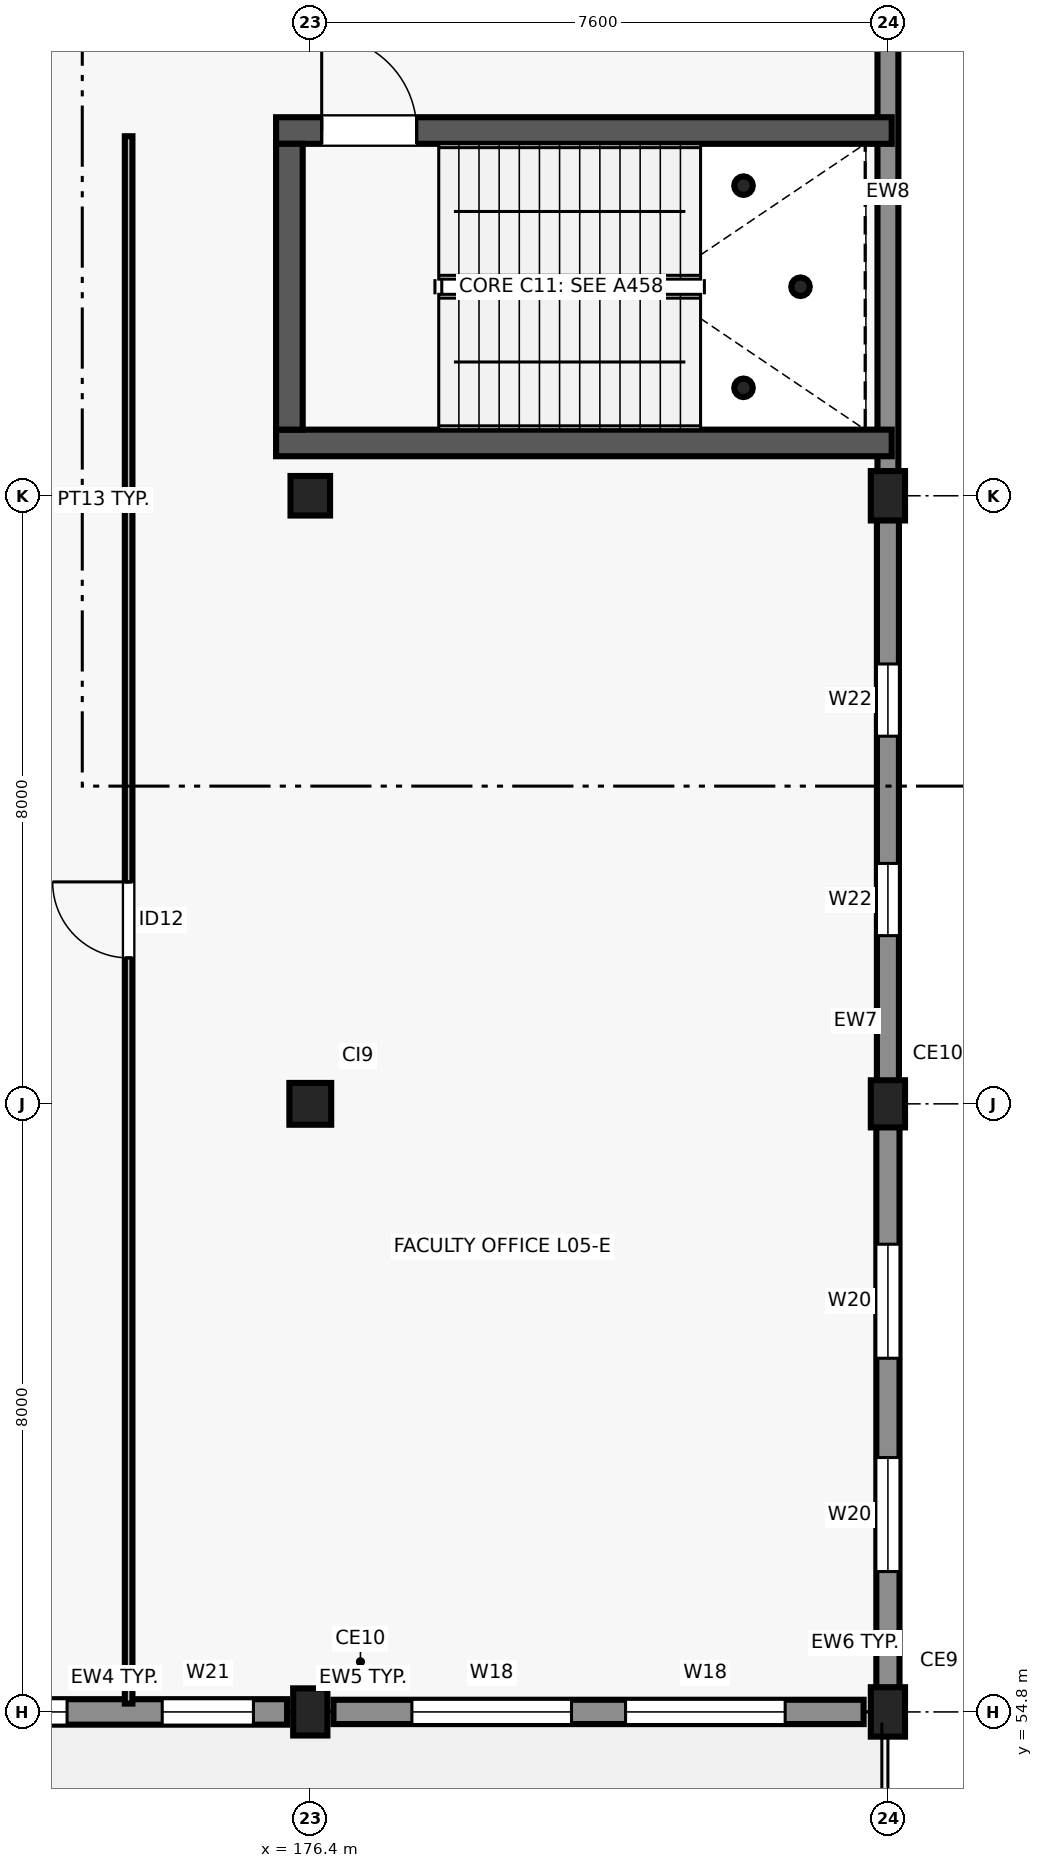
"""IFC4 building model, lengths in metres.
Left out: names, types, materials, properties, quantities, classifications, styles, units other than length and angle.
Written with IfcOpenShell. Run it as: python <this file> out.ifc"""

import sys

from ifc_helpers import new_model, si_unit, direction, frame, frame_2d, origin, origin_2d, place, context, subcontext, project, spatial, rectangle, hollow_circle, extrude, element, fill, save


model = new_model("IFC4")
c1 = context("Model", 3, precision=1e-05, world=origin(), true_north=direction((0.0, 1.0)))
c2 = subcontext(c1, "Body", "Model", "MODEL_VIEW")
j1 = project(units=[si_unit("LENGTHUNIT", "METRE"), si_unit("PLANEANGLEUNIT", "RADIAN")], contexts=[c1])
p1 = place(None, origin())
s1 = spatial("IfcSite", under=j1, at=p1, CompositionType="ELEMENT")
p2 = place(p1, origin())
s2 = spatial("IfcBuilding", under=s1, at=p2, CompositionType="ELEMENT")
p3 = place(p2, frame((0.0, 0.0, 21.6)))
s3 = spatial("IfcBuildingStorey", under=s2, at=p3, CompositionType="ELEMENT", Elevation=21.6)
p4 = place(p3, frame((176.4, 54.8, 0.0), z_axis=(0.0, 0.0, 1.0), x_axis=(1.0, 0.0, 0.0)))
e1 = element("IfcColumn", 1, at=p4, inside=s3, PredefinedType="COLUMN", context=c2, shape_type="SweptSolid", body=[
    extrude(rectangle(XDim=0.62, YDim=0.45, at=origin_2d()), origin(), (0.0, 0.0, 1.0), 4.2),
])
p5 = place(p3, frame((176.4, 62.8, 0.0), z_axis=(0.0, 0.0, 1.0), x_axis=(1.0, 0.0, 0.0)))
e2 = element("IfcColumn", 2, at=p5, inside=s3, PredefinedType="COLUMN", context=c2, shape_type="SweptSolid", body=[
    extrude(rectangle(XDim=0.55, YDim=0.55, at=origin_2d()), origin(), (0.0, 0.0, 1.0), 4.2),
])
p6 = place(p3, frame((176.4, 70.8, 0.0), z_axis=(0.0, 0.0, 1.0), x_axis=(1.0, 0.0, 0.0)))
e3 = element("IfcColumn", 3, at=p6, inside=s3, PredefinedType="COLUMN", context=c2, shape_type="SweptSolid", body=[
    extrude(rectangle(XDim=0.52, YDim=0.52, at=origin_2d()), origin(), (0.0, 0.0, 1.0), 4.2),
])
p7 = place(p3, frame((184.0, 54.8, 0.0), z_axis=(0.0, 0.0, 1.0), x_axis=(1.0, 0.0, 0.0)))
e4 = element("IfcColumn", 4, at=p7, inside=s3, PredefinedType="COLUMN", context=c2, shape_type="SweptSolid", body=[
    extrude(rectangle(XDim=0.65, YDim=0.45, at=origin_2d()), origin(), (0.0, 0.0, 1.0), 4.2),
])
p8 = place(p3, frame((184.0, 62.8, 0.0), z_axis=(0.0, 0.0, 1.0), x_axis=(1.0, 0.0, 0.0)))
e5 = element("IfcColumn", 5, at=p8, inside=s3, PredefinedType="COLUMN", context=c2, shape_type="SweptSolid", body=[
    extrude(rectangle(XDim=0.62, YDim=0.45, at=origin_2d()), origin(), (0.0, 0.0, 1.0), 4.2),
])
p9 = place(p3, frame((184.0, 70.8, 0.0), z_axis=(0.0, 0.0, 1.0), x_axis=(1.0, 0.0, 0.0)))
e6 = element("IfcColumn", 6, at=p9, inside=s3, PredefinedType="COLUMN", context=c2, shape_type="SweptSolid", body=[
    extrude(rectangle(XDim=0.65, YDim=0.45, at=origin_2d()), origin(), (0.0, 0.0, 1.0), 4.2),
])
p10 = place(p3, frame((169.12, 54.8, 0.0), z_axis=(0.0, 0.0, 1.0), x_axis=(1.0, 0.0, 0.0)))
e7 = element("IfcWall", 7, at=p10, inside=s3, PredefinedType="SOLIDWALL", context=c2, shape_type="SweptSolid", body=[
    extrude(rectangle(XDim=6.975, YDim=0.335, at=frame_2d((3.487, 0.0))), origin(), (0.0, 0.0, 1.0), 3.43),
])
p11 = place(p10, frame((0.335, 0.0, 0.9)))
e8 = element("IfcOpeningElement", 8, at=p11, cuts=e7, PredefinedType="OPENING", context=c2, shape_type="SweptSolid", body=[
    extrude(rectangle(XDim=1.4, YDim=1.5, at=frame_2d((0.7, 0.75))), frame((0.0, 0.177, 0.0), z_axis=(0.0, -1.0, 0.0), x_axis=(1.0, 0.0, 0.0)), (0.0, 0.0, 1.0), 0.355),
])
p12 = place(p10, frame((2.88, 0.0, 0.9)))
e9 = element("IfcOpeningElement", 9, at=p12, cuts=e7, PredefinedType="OPENING", context=c2, shape_type="SweptSolid", body=[
    extrude(rectangle(XDim=1.2, YDim=1.5, at=frame_2d((0.6, 0.75))), frame((0.0, 0.177, 0.0), z_axis=(0.0, -1.0, 0.0), x_axis=(1.0, 0.0, 0.0)), (0.0, 0.0, 1.0), 0.355),
])
p13 = place(p10, frame((5.332, 0.0, 0.9)))
e10 = element("IfcOpeningElement", 10, at=p13, cuts=e7, PredefinedType="OPENING", context=c2, shape_type="SweptSolid", body=[
    extrude(rectangle(XDim=1.2, YDim=1.25, at=frame_2d((0.6, 0.625))), frame((0.0, 0.177, 0.0), z_axis=(0.0, -1.0, 0.0), x_axis=(1.0, 0.0, 0.0)), (0.0, 0.0, 1.0), 0.355),
])
p14 = place(p3, frame((176.705, 54.8, 0.0), z_axis=(0.0, 0.0, 1.0), x_axis=(1.0, 0.0, 0.0)))
e11 = element("IfcWall", 11, at=p14, inside=s3, PredefinedType="SOLIDWALL", context=c2, shape_type="SweptSolid", body=[
    extrude(rectangle(XDim=6.975, YDim=0.32, at=frame_2d((3.487, 0.0))), origin(), (0.0, 0.0, 1.0), 3.43),
])
p15 = place(p14, frame((1.032, 0.0, 0.9)))
e12 = element("IfcOpeningElement", 12, at=p15, cuts=e11, PredefinedType="OPENING", context=c2, shape_type="SweptSolid", body=[
    extrude(rectangle(XDim=2.1, YDim=1.25, at=frame_2d((1.05, 0.625))), frame((0.0, 0.17, 0.0), z_axis=(0.0, -1.0, 0.0), x_axis=(1.0, 0.0, 0.0)), (0.0, 0.0, 1.0), 0.34),
])
p16 = place(p14, frame((3.843, 0.0, 0.9)))
e13 = element("IfcOpeningElement", 13, at=p16, cuts=e11, PredefinedType="OPENING", context=c2, shape_type="SweptSolid", body=[
    extrude(rectangle(XDim=2.1, YDim=1.25, at=frame_2d((1.05, 0.625))), frame((0.0, 0.17, 0.0), z_axis=(0.0, -1.0, 0.0), x_axis=(1.0, 0.0, 0.0)), (0.0, 0.0, 1.0), 0.34),
])
p17 = place(p3, frame((184.0, 55.02, 0.0), z_axis=(0.0, 0.0, 1.0), x_axis=(0.0, 1.0, 0.0)))
e14 = element("IfcWall", 14, at=p17, inside=s3, PredefinedType="SOLIDWALL", context=c2, shape_type="SweptSolid", body=[
    extrude(rectangle(XDim=7.56, YDim=0.305, at=frame_2d((3.78, 0.0))), origin(), (0.0, 0.0, 1.0), 3.46),
])
p18 = place(p17, frame((1.627, 0.0, 0.9)))
e15 = element("IfcOpeningElement", 15, at=p18, cuts=e14, PredefinedType="OPENING", context=c2, shape_type="SweptSolid", body=[
    extrude(rectangle(XDim=1.5, YDim=1.25, at=frame_2d((0.75, 0.625))), frame((0.0, 0.162, 0.0), z_axis=(0.0, -1.0, 0.0), x_axis=(1.0, 0.0, 0.0)), (0.0, 0.0, 1.0), 0.325),
])
p19 = place(p17, frame((4.433, 0.0, 0.9)))
e16 = element("IfcOpeningElement", 16, at=p19, cuts=e14, PredefinedType="OPENING", context=c2, shape_type="SweptSolid", body=[
    extrude(rectangle(XDim=1.5, YDim=1.25, at=frame_2d((0.75, 0.625))), frame((0.0, 0.162, 0.0), z_axis=(0.0, -1.0, 0.0), x_axis=(1.0, 0.0, 0.0)), (0.0, 0.0, 1.0), 0.325),
])
p20 = place(p3, frame((184.0, 63.02, 0.0), z_axis=(0.0, 0.0, 1.0), x_axis=(0.0, 1.0, 0.0)))
e17 = element("IfcWall", 17, at=p20, inside=s3, PredefinedType="SOLIDWALL", context=c2, shape_type="SweptSolid", body=[
    extrude(rectangle(XDim=7.56, YDim=0.29, at=frame_2d((3.78, 0.0))), origin(), (0.0, 0.0, 1.0), 3.52),
])
p21 = place(p20, frame((1.993, 0.0, 0.9)))
e18 = element("IfcOpeningElement", 18, at=p21, cuts=e17, PredefinedType="OPENING", context=c2, shape_type="SweptSolid", body=[
    extrude(rectangle(XDim=0.95, YDim=1.25, at=frame_2d((0.475, 0.625))), frame((0.0, 0.155, 0.0), z_axis=(0.0, -1.0, 0.0), x_axis=(1.0, 0.0, 0.0)), (0.0, 0.0, 1.0), 0.31),
])
p22 = place(p20, frame((4.617, 0.0, 0.9)))
e19 = element("IfcOpeningElement", 19, at=p22, cuts=e17, PredefinedType="OPENING", context=c2, shape_type="SweptSolid", body=[
    extrude(rectangle(XDim=0.95, YDim=1.25, at=frame_2d((0.475, 0.625))), frame((0.0, 0.155, 0.0), z_axis=(0.0, -1.0, 0.0), x_axis=(1.0, 0.0, 0.0)), (0.0, 0.0, 1.0), 0.31),
])
p23 = place(p3, frame((184.0, 71.02, 0.0), z_axis=(0.0, 0.0, 1.0), x_axis=(0.0, 1.0, 0.0)))
e20 = element("IfcWall", 20, at=p23, inside=s3, PredefinedType="SOLIDWALL", context=c2, shape_type="SweptSolid", body=[
    extrude(rectangle(XDim=7.56, YDim=0.275, at=frame_2d((3.78, 0.0))), origin(), (0.0, 0.0, 1.0), 3.92),
])
for number, where, z_axis, x_axis in (
    (21, (182.1, 72.22, 0.0), (0.0, 0.0, 1.0), (1.0, 0.0, 0.0)),
    (22, (182.1, 74.88, 0.0), (0.0, 0.0, 1.0), (1.0, 0.0, 0.0)),
    (23, (182.85, 73.55, 0.0), (0.0, 0.0, 1.0), (1.0, 0.0, 0.0)),
):
    element("IfcColumn", number, at=place(p3, frame(where, z_axis=z_axis, x_axis=x_axis)), inside=s3, PredefinedType="COLUMN", context=c2, shape_type="SweptSolid", body=[
        extrude(hollow_circle(Radius=0.122, WallThickness=0.01, at=origin_2d()), origin(), (0.0, 0.0, 1.0), 1.9),
    ])
p24 = place(p3, frame((175.95, 71.495, 0.0), z_axis=(0.0, 0.0, 1.0), x_axis=(1.0, 0.0, 0.0)))
e24 = element("IfcWall", 24, at=p24, inside=s3, PredefinedType="SHEAR", context=c2, shape_type="SweptSolid", body=[
    extrude(rectangle(XDim=8.1, YDim=0.35, at=frame_2d((4.05, 0.0))), origin(), (0.0, 0.0, 1.0), 3.92),
])
p25 = place(p3, frame((175.95, 75.605, 0.0), z_axis=(0.0, 0.0, 1.0), x_axis=(1.0, 0.0, 0.0)))
e25 = element("IfcWall", 25, at=p25, inside=s3, PredefinedType="SHEAR", context=c2, shape_type="SweptSolid", body=[
    extrude(rectangle(XDim=8.1, YDim=0.35, at=frame_2d((4.05, 0.0))), origin(), (0.0, 0.0, 1.0), 3.92),
])
p26 = place(p25, frame((0.6, 0.0, 0.0)))
e26 = element("IfcOpeningElement", 26, at=p26, cuts=e25, PredefinedType="OPENING", context=c2, shape_type="SweptSolid", body=[
    extrude(rectangle(XDim=1.25, YDim=2.2, at=frame_2d((0.625, 1.1))), frame((0.0, 0.185, 0.0), z_axis=(0.0, -1.0, 0.0), x_axis=(1.0, 0.0, 0.0)), (0.0, 0.0, 1.0), 0.37),
])
p27 = place(p3, frame((176.125, 71.67, 0.0), z_axis=(0.0, 0.0, 1.0), x_axis=(0.0, 1.0, 0.0)))
e27 = element("IfcWall", 27, at=p27, inside=s3, PredefinedType="SHEAR", context=c2, shape_type="SweptSolid", body=[
    extrude(rectangle(XDim=3.76, YDim=0.35, at=frame_2d((1.88, 0.0))), origin(), (0.0, 0.0, 1.0), 3.92),
])
p28 = place(p3, frame((174.01, 54.91, 0.0), z_axis=(0.0, 0.0, 1.0), x_axis=(0.0, 1.0, 0.0)))
e28 = element("IfcWall", 28, at=p28, inside=s3, PredefinedType="PARTITIONING", context=c2, shape_type="SweptSolid", body=[
    extrude(rectangle(XDim=20.62, YDim=0.1, at=frame_2d((10.31, 0.0))), origin(), (0.0, 0.0, 1.0), 3.9),
])
p29 = place(p28, frame((9.81, 0.0, 0.0)))
e29 = element("IfcOpeningElement", 29, at=p29, cuts=e28, PredefinedType="OPENING", context=c2, shape_type="SweptSolid", body=[
    extrude(rectangle(XDim=1.0, YDim=2.15, at=frame_2d((0.5, 1.075))), frame((0.0, 0.06, 0.0), z_axis=(0.0, -1.0, 0.0), x_axis=(1.0, 0.0, 0.0)), (0.0, 0.0, 1.0), 0.12),
])
p30 = place(p12, origin())
e30 = element("IfcWindow", 30, at=p30, inside=s3, PartitioningType="SINGLE_PANEL", PredefinedType="WINDOW", context=c2, shape_type="SweptSolid", body=[
    extrude(rectangle(XDim=1.2, YDim=1.5, at=frame_2d((0.6, 0.75))), frame((0.0, 0.03, 0.0), z_axis=(0.0, -1.0, 0.0), x_axis=(1.0, 0.0, 0.0)), (0.0, 0.0, 1.0), 0.06),
])
fill(e9, e30)
p31 = place(p13, origin())
e31 = element("IfcWindow", 31, at=p31, inside=s3, PartitioningType="SINGLE_PANEL", PredefinedType="WINDOW", context=c2, shape_type="SweptSolid", body=[
    extrude(rectangle(XDim=1.2, YDim=1.25, at=frame_2d((0.6, 0.625))), frame((0.0, 0.03, 0.0), z_axis=(0.0, -1.0, 0.0), x_axis=(1.0, 0.0, 0.0)), (0.0, 0.0, 1.0), 0.06),
])
fill(e10, e31)
p32 = place(p15, origin())
e32 = element("IfcWindow", 32, at=p32, inside=s3, PartitioningType="SINGLE_PANEL", PredefinedType="WINDOW", context=c2, shape_type="SweptSolid", body=[
    extrude(rectangle(XDim=2.1, YDim=1.25, at=frame_2d((1.05, 0.625))), frame((0.0, 0.03, 0.0), z_axis=(0.0, -1.0, 0.0), x_axis=(1.0, 0.0, 0.0)), (0.0, 0.0, 1.0), 0.06),
])
fill(e12, e32)
p33 = place(p16, origin())
e33 = element("IfcWindow", 33, at=p33, inside=s3, PartitioningType="SINGLE_PANEL", PredefinedType="WINDOW", context=c2, shape_type="SweptSolid", body=[
    extrude(rectangle(XDim=2.1, YDim=1.25, at=frame_2d((1.05, 0.625))), frame((0.0, 0.03, 0.0), z_axis=(0.0, -1.0, 0.0), x_axis=(1.0, 0.0, 0.0)), (0.0, 0.0, 1.0), 0.06),
])
fill(e13, e33)
p34 = place(p18, origin())
e34 = element("IfcWindow", 34, at=p34, inside=s3, PartitioningType="SINGLE_PANEL", PredefinedType="WINDOW", context=c2, shape_type="SweptSolid", body=[
    extrude(rectangle(XDim=1.5, YDim=1.25, at=frame_2d((0.75, 0.625))), frame((0.0, 0.03, 0.0), z_axis=(0.0, -1.0, 0.0), x_axis=(1.0, 0.0, 0.0)), (0.0, 0.0, 1.0), 0.06),
])
fill(e15, e34)
p35 = place(p19, origin())
e35 = element("IfcWindow", 35, at=p35, inside=s3, PartitioningType="SINGLE_PANEL", PredefinedType="WINDOW", context=c2, shape_type="SweptSolid", body=[
    extrude(rectangle(XDim=1.5, YDim=1.25, at=frame_2d((0.75, 0.625))), frame((0.0, 0.03, 0.0), z_axis=(0.0, -1.0, 0.0), x_axis=(1.0, 0.0, 0.0)), (0.0, 0.0, 1.0), 0.06),
])
fill(e16, e35)
p36 = place(p21, origin())
e36 = element("IfcWindow", 36, at=p36, inside=s3, PartitioningType="SINGLE_PANEL", PredefinedType="WINDOW", context=c2, shape_type="SweptSolid", body=[
    extrude(rectangle(XDim=0.95, YDim=1.25, at=frame_2d((0.475, 0.625))), frame((0.0, 0.03, 0.0), z_axis=(0.0, -1.0, 0.0), x_axis=(1.0, 0.0, 0.0)), (0.0, 0.0, 1.0), 0.06),
])
fill(e18, e36)
p37 = place(p22, origin())
e37 = element("IfcWindow", 37, at=p37, inside=s3, PartitioningType="SINGLE_PANEL", PredefinedType="WINDOW", context=c2, shape_type="SweptSolid", body=[
    extrude(rectangle(XDim=0.95, YDim=1.25, at=frame_2d((0.475, 0.625))), frame((0.0, 0.03, 0.0), z_axis=(0.0, -1.0, 0.0), x_axis=(1.0, 0.0, 0.0)), (0.0, 0.0, 1.0), 0.06),
])
fill(e19, e37)
p38 = place(p26, origin())
e38 = element("IfcDoor", 38, at=p38, inside=s3, OperationType="SINGLE_SWING_LEFT", PredefinedType="DOOR", context=c2, shape_type="SweptSolid", body=[
    extrude(rectangle(XDim=1.25, YDim=2.2, at=frame_2d((0.625, 1.1))), frame((0.0, 0.025, 0.0), z_axis=(0.0, -1.0, 0.0), x_axis=(1.0, 0.0, 0.0)), (0.0, 0.0, 1.0), 0.05),
])
fill(e26, e38)
p39 = place(p29, origin())
e39 = element("IfcDoor", 39, at=p39, inside=s3, OperationType="SINGLE_SWING_RIGHT", PredefinedType="DOOR", context=c2, shape_type="SweptSolid", body=[
    extrude(rectangle(XDim=1.0, YDim=2.15, at=frame_2d((0.5, 1.075))), frame((0.0, 0.025, 0.0), z_axis=(0.0, -1.0, 0.0), x_axis=(1.0, 0.0, 0.0)), (0.0, 0.0, 1.0), 0.05),
])
fill(e29, e39)
save(model, sys.argv[1])
